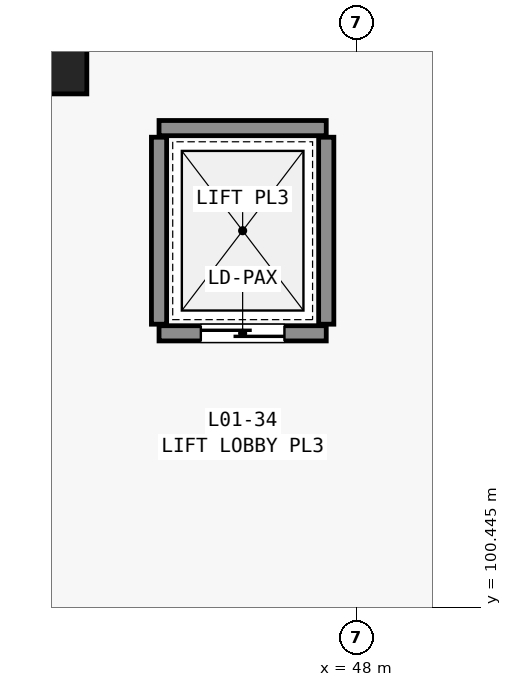
"""IFC4 building model, lengths in metres.
Left out: names, types, materials, properties, quantities, classifications, styles, units other than length and angle.
Written with IfcOpenShell. Run it as: python <this file> out.ifc"""

import sys

from ifc_helpers import new_model, si_unit, direction, frame, frame_2d, origin, origin_2d, place, context, subcontext, project, spatial, rectangle, extrude, element, fill, save


model = new_model("IFC4")
c1 = context("Model", 3, precision=1e-05, world=origin(), true_north=direction((0.0, 1.0)))
c2 = subcontext(c1, "Body", "Model", "MODEL_VIEW")
j1 = project(units=[si_unit("LENGTHUNIT", "METRE"), si_unit("PLANEANGLEUNIT", "RADIAN")], contexts=[c1])
p1 = place(None, origin())
s1 = spatial("IfcSite", under=j1, at=p1, CompositionType="ELEMENT")
p2 = place(p1, origin())
s2 = spatial("IfcBuilding", under=s1, at=p2, CompositionType="ELEMENT")
p3 = place(p2, frame((0.0, 0.0, 6.0)))
s3 = spatial("IfcBuildingStorey", under=s2, at=p3, CompositionType="ELEMENT", Elevation=6.0)
p4 = place(p3, frame((44.0, 107.8, 0.0), z_axis=(0.0, 0.0, 1.0), x_axis=(1.0, 0.0, 0.0)))
e1 = element("IfcColumn", 1, at=p4, inside=s3, PredefinedType="PILASTER", context=c2, shape_type="SweptSolid", body=[
    extrude(rectangle(XDim=0.9, YDim=1.2, at=origin_2d()), origin(), (0.0, 0.0, 1.0), 5.4),
])
p5 = place(p3, frame((45.4, 104.05, 0.0), z_axis=(0.0, 0.0, 1.0), x_axis=(1.0, 0.0, 0.0)))
e2 = element("IfcWall", 2, at=p5, inside=s3, PredefinedType="STANDARD", context=c2, shape_type="SweptSolid", body=[
    extrude(rectangle(XDim=2.2, YDim=0.2, at=frame_2d((1.1, 0.0))), origin(), (0.0, 0.0, 1.0), 5.04),
])
p6 = place(p5, frame((0.55, 0.0, 0.0)))
e3 = element("IfcOpeningElement", 3, at=p6, cuts=e2, PredefinedType="OPENING", context=c2, shape_type="SweptSolid", body=[
    extrude(rectangle(XDim=1.1, YDim=2.15, at=frame_2d((0.55, 1.075))), frame((0.0, 0.11, 0.0), z_axis=(0.0, -1.0, 0.0), x_axis=(1.0, 0.0, 0.0)), (0.0, 0.0, 1.0), 0.22),
])
p7 = place(p3, frame((45.4, 106.75, 0.0), z_axis=(0.0, 0.0, 1.0), x_axis=(1.0, 0.0, 0.0)))
e4 = element("IfcWall", 4, at=p7, inside=s3, PredefinedType="STANDARD", context=c2, shape_type="SweptSolid", body=[
    extrude(rectangle(XDim=2.2, YDim=0.2, at=frame_2d((1.1, 0.0))), origin(), (0.0, 0.0, 1.0), 5.04),
])
for number, where, z_axis, x_axis in (
    (5, (45.4, 104.17, 0.0), (0.0, 0.0, 1.0), (0.0, 1.0, 0.0)),
    (6, (47.6, 104.17, 0.0), (0.0, 0.0, 1.0), (0.0, 1.0, 0.0)),
):
    element("IfcWall", number, at=place(p3, frame(where, z_axis=z_axis, x_axis=x_axis)), inside=s3, PredefinedType="STANDARD", context=c2, shape_type="SweptSolid", body=[
        extrude(rectangle(XDim=2.46, YDim=0.2, at=frame_2d((1.23, 0.0))), origin(), (0.0, 0.0, 1.0), 5.04),
    ])
p8 = place(p6, origin())
e7 = element("IfcDoor", 7, at=p8, inside=s3, OperationType="SLIDING_TO_LEFT", PredefinedType="DOOR", context=c2, shape_type="SweptSolid", body=[
    extrude(rectangle(XDim=1.1, YDim=2.15, at=frame_2d((0.55, 1.075))), frame((0.0, 0.025, 0.0), z_axis=(0.0, -1.0, 0.0), x_axis=(1.0, 0.0, 0.0)), (0.0, 0.0, 1.0), 0.05),
])
fill(e3, e7)
save(model, sys.argv[1])
